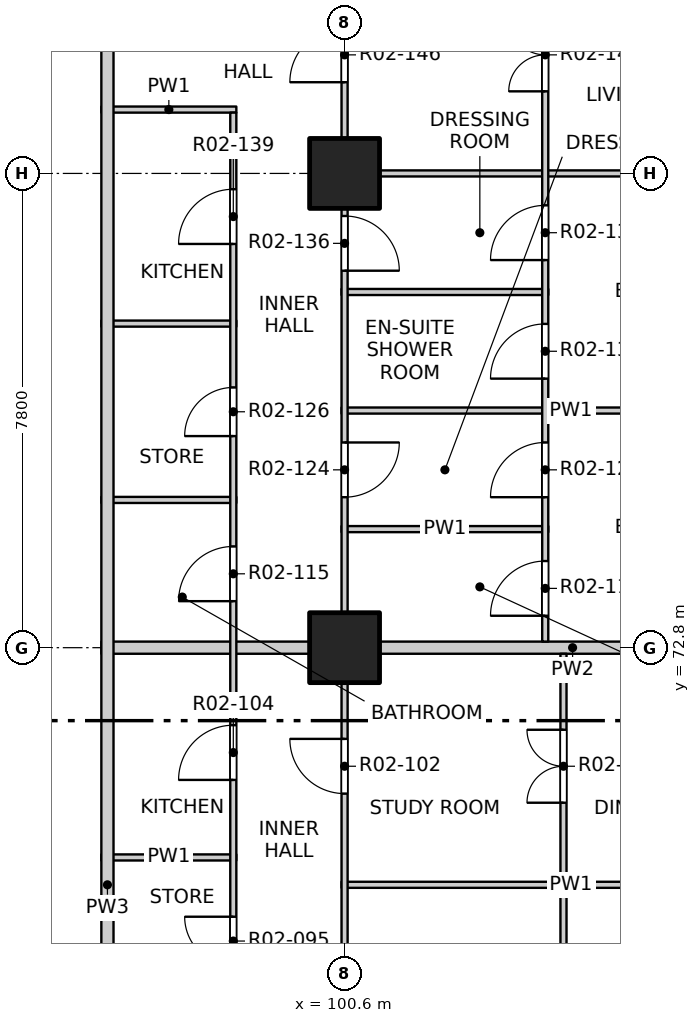
"""IFC4 building model, lengths in metres.
Left out: names, types, materials, properties, quantities, classifications, styles, units other than length and angle.
Written with IfcOpenShell. Run it as: python <this file> out.ifc"""

import sys

from ifc_helpers import new_model, si_unit, direction, frame, frame_2d, origin, origin_2d, place, context, subcontext, project, spatial, rectangle, extrude, element, fill, save


model = new_model("IFC4")
c1 = context("Model", 3, precision=1e-05, world=origin(), true_north=direction((0.0, 1.0)))
c2 = subcontext(c1, "Body", "Model", "MODEL_VIEW")
j1 = project(units=[si_unit("LENGTHUNIT", "METRE"), si_unit("PLANEANGLEUNIT", "RADIAN")], contexts=[c1])
p1 = place(None, origin())
s1 = spatial("IfcSite", under=j1, at=p1, CompositionType="ELEMENT")
p2 = place(p1, origin())
s2 = spatial("IfcBuilding", under=s1, at=p2, CompositionType="ELEMENT")
p3 = place(p2, frame((0.0, 0.0, 29.7)))
s3 = spatial("IfcBuildingStorey", under=s2, at=p3, CompositionType="ELEMENT", Elevation=29.7)
for number, where, z_axis, x_axis in (
    (1, (100.6, 72.8, -0.25), (0.0, 0.0, 1.0), (1.0, 0.0, 0.0)),
    (2, (100.6, 80.6, -0.25), (0.0, 0.0, 1.0), (1.0, 0.0, 0.0)),
):
    element("IfcColumn", number, at=place(p3, frame(where, z_axis=z_axis, x_axis=x_axis)), inside=s3, PredefinedType="COLUMN", context=c2, shape_type="SweptSolid", body=[
        extrude(rectangle(XDim=1.15, YDim=1.15, at=origin_2d()), origin(), (0.0, 0.0, 1.0), 3.4),
    ])
p4 = place(p3, frame((100.55, 68.9, 0.0), z_axis=(0.0, 0.0, 1.0), x_axis=(1.0, 0.0, 0.0)))
e3 = element("IfcWall", 3, at=p4, inside=s3, PredefinedType="PARTITIONING", context=c2, shape_type="SweptSolid", body=[
    extrude(rectangle(XDim=7.55, YDim=0.1, at=frame_2d((3.775, 0.0))), origin(), (0.0, 0.0, 1.0), 3.15),
])
p5 = place(p3, frame((96.6, 69.35, 0.0), z_axis=(0.0, 0.0, 1.0), x_axis=(1.0, 0.0, 0.0)))
e4 = element("IfcWall", 4, at=p5, inside=s3, PredefinedType="PARTITIONING", context=c2, shape_type="SweptSolid", body=[
    extrude(rectangle(XDim=2.22, YDim=0.1, at=frame_2d((1.11, 0.0))), origin(), (0.0, 0.0, 1.0), 3.15),
])
p6 = place(p3, frame((96.6, 72.8, 0.0), z_axis=(0.0, 0.0, 1.0), x_axis=(1.0, 0.0, 0.0)))
e5 = element("IfcWall", 5, at=p6, inside=s3, PredefinedType="PARTITIONING", context=c2, shape_type="SweptSolid", body=[
    extrude(rectangle(XDim=4.0, YDim=0.2, at=frame_2d((2.0, 0.0))), origin(), (0.0, 0.0, 1.0), 3.15),
])
p7 = place(p3, frame((100.6, 72.8, 0.0), z_axis=(0.0, 0.0, 1.0), x_axis=(1.0, 0.0, 0.0)))
e6 = element("IfcWall", 6, at=p7, inside=s3, PredefinedType="PARTITIONING", context=c2, shape_type="SweptSolid", body=[
    extrude(rectangle(XDim=7.5, YDim=0.2, at=frame_2d((3.75, 0.0))), origin(), (0.0, 0.0, 1.0), 2.55),
])
p8 = place(p3, frame((100.55, 74.75, 0.0), z_axis=(0.0, 0.0, 1.0), x_axis=(1.0, 0.0, 0.0)))
e7 = element("IfcWall", 7, at=p8, inside=s3, PredefinedType="PARTITIONING", context=c2, shape_type="SweptSolid", body=[
    extrude(rectangle(XDim=3.4, YDim=0.1, at=frame_2d((1.7, 0.0))), origin(), (0.0, 0.0, 1.0), 3.15),
])
p9 = place(p3, frame((96.6, 75.23, 0.0), z_axis=(0.0, 0.0, 1.0), x_axis=(1.0, 0.0, 0.0)))
e8 = element("IfcWall", 8, at=p9, inside=s3, PredefinedType="PARTITIONING", context=c2, shape_type="SweptSolid", body=[
    extrude(rectangle(XDim=2.22, YDim=0.1, at=frame_2d((1.11, 0.0))), origin(), (0.0, 0.0, 1.0), 3.15),
])
p10 = place(p3, frame((100.55, 76.7, 0.0), z_axis=(0.0, 0.0, 1.0), x_axis=(1.0, 0.0, 0.0)))
e9 = element("IfcWall", 9, at=p10, inside=s3, PredefinedType="PARTITIONING", context=c2, shape_type="SweptSolid", body=[
    extrude(rectangle(XDim=7.55, YDim=0.1, at=frame_2d((3.775, 0.0))), origin(), (0.0, 0.0, 1.0), 3.15),
])
p11 = place(p3, frame((96.6, 78.13, 0.0), z_axis=(0.0, 0.0, 1.0), x_axis=(1.0, 0.0, 0.0)))
e10 = element("IfcWall", 10, at=p11, inside=s3, PredefinedType="PARTITIONING", context=c2, shape_type="SweptSolid", body=[
    extrude(rectangle(XDim=2.22, YDim=0.1, at=frame_2d((1.11, 0.0))), origin(), (0.0, 0.0, 1.0), 3.15),
])
p12 = place(p3, frame((100.55, 78.65, 0.0), z_axis=(0.0, 0.0, 1.0), x_axis=(1.0, 0.0, 0.0)))
e11 = element("IfcWall", 11, at=p12, inside=s3, PredefinedType="PARTITIONING", context=c2, shape_type="SweptSolid", body=[
    extrude(rectangle(XDim=3.4, YDim=0.1, at=frame_2d((1.7, 0.0))), origin(), (0.0, 0.0, 1.0), 3.15),
])
p13 = place(p3, frame((100.55, 80.6, 0.0), z_axis=(0.0, 0.0, 1.0), x_axis=(1.0, 0.0, 0.0)))
e12 = element("IfcWall", 12, at=p13, inside=s3, PredefinedType="PARTITIONING", context=c2, shape_type="SweptSolid", body=[
    extrude(rectangle(XDim=7.55, YDim=0.1, at=frame_2d((3.775, 0.0))), origin(), (0.0, 0.0, 1.0), 2.55),
])
p14 = place(p3, frame((96.6, 81.65, 0.0), z_axis=(0.0, 0.0, 1.0), x_axis=(1.0, 0.0, 0.0)))
e13 = element("IfcWall", 13, at=p14, inside=s3, PredefinedType="PARTITIONING", context=c2, shape_type="SweptSolid", body=[
    extrude(rectangle(XDim=2.22, YDim=0.1, at=frame_2d((1.11, 0.0))), origin(), (0.0, 0.0, 1.0), 3.15),
])
p15 = place(p3, frame((96.7, 53.4, 0.0), z_axis=(0.0, 0.0, 1.0), x_axis=(0.0, 1.0, 0.0)))
e14 = element("IfcWall", 14, at=p15, inside=s3, PredefinedType="PARTITIONING", context=c2, shape_type="SweptSolid", body=[
    extrude(rectangle(XDim=31.0, YDim=0.2, at=frame_2d((15.5, 0.0))), origin(), (0.0, 0.0, 1.0), 3.15),
])
p16 = place(p15, frame((2.425, 0.0, 0.0)))
e15 = element("IfcOpeningElement", 15, at=p16, cuts=e14, PredefinedType="OPENING", context=c2, shape_type="SweptSolid", body=[
    extrude(rectangle(XDim=1.0, YDim=2.1, at=frame_2d((0.5, 1.05))), frame((0.0, 0.11, 0.0), z_axis=(0.0, -1.0, 0.0), x_axis=(1.0, 0.0, 0.0)), (0.0, 0.0, 1.0), 0.22),
])
p17 = place(p15, frame((13.375, 0.0, 0.0)))
e16 = element("IfcOpeningElement", 16, at=p17, cuts=e14, PredefinedType="OPENING", context=c2, shape_type="SweptSolid", body=[
    extrude(rectangle(XDim=1.0, YDim=2.1, at=frame_2d((0.5, 1.05))), frame((0.0, 0.11, 0.0), z_axis=(0.0, -1.0, 0.0), x_axis=(1.0, 0.0, 0.0)), (0.0, 0.0, 1.0), 0.22),
])
p18 = place(p15, frame((29.525, 0.0, 0.0)))
e17 = element("IfcOpeningElement", 17, at=p18, cuts=e14, PredefinedType="OPENING", context=c2, shape_type="SweptSolid", body=[
    extrude(rectangle(XDim=1.0, YDim=2.1, at=frame_2d((0.5, 1.05))), frame((0.0, 0.11, 0.0), z_axis=(0.0, -1.0, 0.0), x_axis=(1.0, 0.0, 0.0)), (0.0, 0.0, 1.0), 0.22),
])
p19 = place(p3, frame((98.77, 66.65, 0.0), z_axis=(0.0, 0.0, 1.0), x_axis=(0.0, 1.0, 0.0)))
e18 = element("IfcWall", 18, at=p19, inside=s3, PredefinedType="PARTITIONING", context=c2, shape_type="SweptSolid", body=[
    extrude(rectangle(XDim=14.95, YDim=0.1, at=frame_2d((7.475, 0.0))), origin(), (0.0, 0.0, 1.0), 3.15),
])
p20 = place(p19, frame((0.925, 0.0, 0.0)))
e19 = element("IfcOpeningElement", 19, at=p20, cuts=e18, PredefinedType="OPENING", context=c2, shape_type="SweptSolid", body=[
    extrude(rectangle(XDim=0.8, YDim=2.1, at=frame_2d((0.4, 1.05))), frame((0.0, 0.06, 0.0), z_axis=(0.0, -1.0, 0.0), x_axis=(1.0, 0.0, 0.0)), (0.0, 0.0, 1.0), 0.12),
])
p21 = place(p19, frame((3.975, 0.0, 0.0)))
e20 = element("IfcOpeningElement", 20, at=p21, cuts=e18, PredefinedType="OPENING", context=c2, shape_type="SweptSolid", body=[
    extrude(rectangle(XDim=0.9, YDim=2.1, at=frame_2d((0.45, 1.05))), frame((0.0, 0.06, 0.0), z_axis=(0.0, -1.0, 0.0), x_axis=(1.0, 0.0, 0.0)), (0.0, 0.0, 1.0), 0.12),
])
p22 = place(p19, frame((6.915, 0.0, 0.0)))
e21 = element("IfcOpeningElement", 21, at=p22, cuts=e18, PredefinedType="OPENING", context=c2, shape_type="SweptSolid", body=[
    extrude(rectangle(XDim=0.9, YDim=2.1, at=frame_2d((0.45, 1.05))), frame((0.0, 0.06, 0.0), z_axis=(0.0, -1.0, 0.0), x_axis=(1.0, 0.0, 0.0)), (0.0, 0.0, 1.0), 0.12),
])
p23 = place(p19, frame((9.63, 0.0, 0.0)))
e22 = element("IfcOpeningElement", 22, at=p23, cuts=e18, PredefinedType="OPENING", context=c2, shape_type="SweptSolid", body=[
    extrude(rectangle(XDim=0.8, YDim=2.1, at=frame_2d((0.4, 1.05))), frame((0.0, 0.06, 0.0), z_axis=(0.0, -1.0, 0.0), x_axis=(1.0, 0.0, 0.0)), (0.0, 0.0, 1.0), 0.12),
])
p24 = place(p19, frame((12.79, 0.0, 0.0)))
e23 = element("IfcOpeningElement", 23, at=p24, cuts=e18, PredefinedType="OPENING", context=c2, shape_type="SweptSolid", body=[
    extrude(rectangle(XDim=0.9, YDim=2.1, at=frame_2d((0.45, 1.05))), frame((0.0, 0.06, 0.0), z_axis=(0.0, -1.0, 0.0), x_axis=(1.0, 0.0, 0.0)), (0.0, 0.0, 1.0), 0.12),
])
p25 = place(p3, frame((100.6, 49.4, 0.0), z_axis=(0.0, 0.0, 1.0), x_axis=(0.0, 1.0, 0.0)))
e24 = element("IfcWall", 24, at=p25, inside=s3, PredefinedType="PARTITIONING", context=c2, shape_type="SweptSolid", body=[
    extrude(rectangle(XDim=31.2, YDim=0.1, at=frame_2d((15.6, 0.0))), origin(), (0.0, 0.0, 1.0), 3.15),
])
p26 = place(p25, frame((2.475, 0.0, 0.0)))
e25 = element("IfcOpeningElement", 25, at=p26, cuts=e24, PredefinedType="OPENING", context=c2, shape_type="SweptSolid", body=[
    extrude(rectangle(XDim=0.9, YDim=2.1, at=frame_2d((0.45, 1.05))), frame((0.0, 0.06, 0.0), z_axis=(0.0, -1.0, 0.0), x_axis=(1.0, 0.0, 0.0)), (0.0, 0.0, 1.0), 0.12),
])
p27 = place(p25, frame((5.4, 0.0, 0.0)))
e26 = element("IfcOpeningElement", 26, at=p27, cuts=e24, PredefinedType="OPENING", context=c2, shape_type="SweptSolid", body=[
    extrude(rectangle(XDim=0.9, YDim=2.1, at=frame_2d((0.45, 1.05))), frame((0.0, 0.06, 0.0), z_axis=(0.0, -1.0, 0.0), x_axis=(1.0, 0.0, 0.0)), (0.0, 0.0, 1.0), 0.12),
])
p28 = place(p25, frame((10.275, 0.0, 0.0)))
e27 = element("IfcOpeningElement", 27, at=p28, cuts=e24, PredefinedType="OPENING", context=c2, shape_type="SweptSolid", body=[
    extrude(rectangle(XDim=0.9, YDim=2.1, at=frame_2d((0.45, 1.05))), frame((0.0, 0.06, 0.0), z_axis=(0.0, -1.0, 0.0), x_axis=(1.0, 0.0, 0.0)), (0.0, 0.0, 1.0), 0.12),
])
p29 = place(p25, frame((14.0, 0.0, 0.0)))
e28 = element("IfcOpeningElement", 28, at=p29, cuts=e24, PredefinedType="OPENING", context=c2, shape_type="SweptSolid", body=[
    extrude(rectangle(XDim=0.9, YDim=2.1, at=frame_2d((0.45, 1.05))), frame((0.0, 0.06, 0.0), z_axis=(0.0, -1.0, 0.0), x_axis=(1.0, 0.0, 0.0)), (0.0, 0.0, 1.0), 0.12),
])
p30 = place(p25, frame((17.1, 0.0, 0.0)))
e29 = element("IfcOpeningElement", 29, at=p30, cuts=e24, PredefinedType="OPENING", context=c2, shape_type="SweptSolid", body=[
    extrude(rectangle(XDim=0.9, YDim=2.1, at=frame_2d((0.45, 1.05))), frame((0.0, 0.06, 0.0), z_axis=(0.0, -1.0, 0.0), x_axis=(1.0, 0.0, 0.0)), (0.0, 0.0, 1.0), 0.12),
])
p31 = place(p25, frame((21.0, 0.0, 0.0)))
e30 = element("IfcOpeningElement", 30, at=p31, cuts=e24, PredefinedType="OPENING", context=c2, shape_type="SweptSolid", body=[
    extrude(rectangle(XDim=0.9, YDim=2.1, at=frame_2d((0.45, 1.05))), frame((0.0, 0.06, 0.0), z_axis=(0.0, -1.0, 0.0), x_axis=(1.0, 0.0, 0.0)), (0.0, 0.0, 1.0), 0.12),
])
p32 = place(p25, frame((25.875, 0.0, 0.0)))
e31 = element("IfcOpeningElement", 31, at=p32, cuts=e24, PredefinedType="OPENING", context=c2, shape_type="SweptSolid", body=[
    extrude(rectangle(XDim=0.9, YDim=2.1, at=frame_2d((0.45, 1.05))), frame((0.0, 0.06, 0.0), z_axis=(0.0, -1.0, 0.0), x_axis=(1.0, 0.0, 0.0)), (0.0, 0.0, 1.0), 0.12),
])
p33 = place(p25, frame((29.6, 0.0, 0.0)))
e32 = element("IfcOpeningElement", 32, at=p33, cuts=e24, PredefinedType="OPENING", context=c2, shape_type="SweptSolid", body=[
    extrude(rectangle(XDim=0.9, YDim=2.1, at=frame_2d((0.45, 1.05))), frame((0.0, 0.06, 0.0), z_axis=(0.0, -1.0, 0.0), x_axis=(1.0, 0.0, 0.0)), (0.0, 0.0, 1.0), 0.12),
])
p34 = place(p3, frame((100.6, 80.6, 0.0), z_axis=(0.0, 0.0, 1.0), x_axis=(0.0, 1.0, 0.0)))
e33 = element("IfcWall", 33, at=p34, inside=s3, PredefinedType="PARTITIONING", context=c2, shape_type="SweptSolid", body=[
    extrude(rectangle(XDim=7.5, YDim=0.1, at=frame_2d((3.75, 0.0))), origin(), (0.0, 0.0, 1.0), 2.55),
])
p35 = place(p34, frame((1.5, 0.0, 0.0)))
e34 = element("IfcOpeningElement", 34, at=p35, cuts=e33, PredefinedType="OPENING", context=c2, shape_type="SweptSolid", body=[
    extrude(rectangle(XDim=0.9, YDim=2.1, at=frame_2d((0.45, 1.05))), frame((0.0, 0.06, 0.0), z_axis=(0.0, -1.0, 0.0), x_axis=(1.0, 0.0, 0.0)), (0.0, 0.0, 1.0), 0.12),
])
p36 = place(p34, frame((5.4, 0.0, 0.0)))
e35 = element("IfcOpeningElement", 35, at=p36, cuts=e33, PredefinedType="OPENING", context=c2, shape_type="SweptSolid", body=[
    extrude(rectangle(XDim=0.9, YDim=2.1, at=frame_2d((0.45, 1.05))), frame((0.0, 0.06, 0.0), z_axis=(0.0, -1.0, 0.0), x_axis=(1.0, 0.0, 0.0)), (0.0, 0.0, 1.0), 0.12),
])
p37 = place(p3, frame((103.9, 72.9, 0.0), z_axis=(0.0, 0.0, 1.0), x_axis=(0.0, 1.0, 0.0)))
e36 = element("IfcWall", 36, at=p37, inside=s3, PredefinedType="PARTITIONING", context=c2, shape_type="SweptSolid", body=[
    extrude(rectangle(XDim=15.2, YDim=0.1, at=frame_2d((7.6, 0.0))), origin(), (0.0, 0.0, 1.0), 3.15),
])
p38 = place(p37, frame((0.425, 0.0, 0.0)))
e37 = element("IfcOpeningElement", 37, at=p38, cuts=e36, PredefinedType="OPENING", context=c2, shape_type="SweptSolid", body=[
    extrude(rectangle(XDim=0.9, YDim=2.1, at=frame_2d((0.45, 1.05))), frame((0.0, 0.06, 0.0), z_axis=(0.0, -1.0, 0.0), x_axis=(1.0, 0.0, 0.0)), (0.0, 0.0, 1.0), 0.12),
])
p39 = place(p37, frame((2.375, 0.0, 0.0)))
e38 = element("IfcOpeningElement", 38, at=p39, cuts=e36, PredefinedType="OPENING", context=c2, shape_type="SweptSolid", body=[
    extrude(rectangle(XDim=0.9, YDim=2.1, at=frame_2d((0.45, 1.05))), frame((0.0, 0.06, 0.0), z_axis=(0.0, -1.0, 0.0), x_axis=(1.0, 0.0, 0.0)), (0.0, 0.0, 1.0), 0.12),
])
p40 = place(p37, frame((4.325, 0.0, 0.0)))
e39 = element("IfcOpeningElement", 39, at=p40, cuts=e36, PredefinedType="OPENING", context=c2, shape_type="SweptSolid", body=[
    extrude(rectangle(XDim=0.9, YDim=2.1, at=frame_2d((0.45, 1.05))), frame((0.0, 0.06, 0.0), z_axis=(0.0, -1.0, 0.0), x_axis=(1.0, 0.0, 0.0)), (0.0, 0.0, 1.0), 0.12),
])
p41 = place(p37, frame((6.275, 0.0, 0.0)))
e40 = element("IfcOpeningElement", 40, at=p41, cuts=e36, PredefinedType="OPENING", context=c2, shape_type="SweptSolid", body=[
    extrude(rectangle(XDim=0.9, YDim=2.1, at=frame_2d((0.45, 1.05))), frame((0.0, 0.06, 0.0), z_axis=(0.0, -1.0, 0.0), x_axis=(1.0, 0.0, 0.0)), (0.0, 0.0, 1.0), 0.12),
])
p42 = place(p37, frame((9.05, 0.0, 0.0)))
e41 = element("IfcOpeningElement", 41, at=p42, cuts=e36, PredefinedType="OPENING", context=c2, shape_type="SweptSolid", body=[
    extrude(rectangle(XDim=1.2, YDim=2.1, at=frame_2d((0.6, 1.05))), frame((0.0, 0.06, 0.0), z_axis=(0.0, -1.0, 0.0), x_axis=(1.0, 0.0, 0.0)), (0.0, 0.0, 1.0), 0.12),
])
p43 = place(p37, frame((12.95, 0.0, 0.0)))
e42 = element("IfcOpeningElement", 42, at=p43, cuts=e36, PredefinedType="OPENING", context=c2, shape_type="SweptSolid", body=[
    extrude(rectangle(XDim=1.2, YDim=2.1, at=frame_2d((0.6, 1.05))), frame((0.0, 0.06, 0.0), z_axis=(0.0, -1.0, 0.0), x_axis=(1.0, 0.0, 0.0)), (0.0, 0.0, 1.0), 0.12),
])
p44 = place(p3, frame((104.2, 61.2, 0.0), z_axis=(0.0, 0.0, 1.0), x_axis=(0.0, 1.0, 0.0)))
e43 = element("IfcWall", 43, at=p44, inside=s3, PredefinedType="PARTITIONING", context=c2, shape_type="SweptSolid", body=[
    extrude(rectangle(XDim=11.5, YDim=0.1, at=frame_2d((5.75, 0.0))), origin(), (0.0, 0.0, 1.0), 3.15),
])
p45 = place(p44, frame((0.425, 0.0, 0.0)))
e44 = element("IfcOpeningElement", 44, at=p45, cuts=e43, PredefinedType="OPENING", context=c2, shape_type="SweptSolid", body=[
    extrude(rectangle(XDim=0.9, YDim=2.1, at=frame_2d((0.45, 1.05))), frame((0.0, 0.06, 0.0), z_axis=(0.0, -1.0, 0.0), x_axis=(1.0, 0.0, 0.0)), (0.0, 0.0, 1.0), 0.12),
])
p46 = place(p44, frame((2.375, 0.0, 0.0)))
e45 = element("IfcOpeningElement", 45, at=p46, cuts=e43, PredefinedType="OPENING", context=c2, shape_type="SweptSolid", body=[
    extrude(rectangle(XDim=0.9, YDim=2.1, at=frame_2d((0.45, 1.05))), frame((0.0, 0.06, 0.0), z_axis=(0.0, -1.0, 0.0), x_axis=(1.0, 0.0, 0.0)), (0.0, 0.0, 1.0), 0.12),
])
p47 = place(p44, frame((5.15, 0.0, 0.0)))
e46 = element("IfcOpeningElement", 46, at=p47, cuts=e43, PredefinedType="OPENING", context=c2, shape_type="SweptSolid", body=[
    extrude(rectangle(XDim=1.2, YDim=2.1, at=frame_2d((0.6, 1.05))), frame((0.0, 0.06, 0.0), z_axis=(0.0, -1.0, 0.0), x_axis=(1.0, 0.0, 0.0)), (0.0, 0.0, 1.0), 0.12),
])
p48 = place(p44, frame((9.05, 0.0, 0.0)))
e47 = element("IfcOpeningElement", 47, at=p48, cuts=e43, PredefinedType="OPENING", context=c2, shape_type="SweptSolid", body=[
    extrude(rectangle(XDim=1.2, YDim=2.1, at=frame_2d((0.6, 1.05))), frame((0.0, 0.06, 0.0), z_axis=(0.0, -1.0, 0.0), x_axis=(1.0, 0.0, 0.0)), (0.0, 0.0, 1.0), 0.12),
])
p49 = place(p20, origin())
e48 = element("IfcDoor", 48, at=p49, inside=s3, OperationType="SINGLE_SWING_RIGHT", PredefinedType="DOOR", context=c2, shape_type="SweptSolid", body=[
    extrude(rectangle(XDim=0.8, YDim=2.1, at=frame_2d((0.4, 1.05))), frame((0.0, 0.025, 0.0), z_axis=(0.0, -1.0, 0.0), x_axis=(1.0, 0.0, 0.0)), (0.0, 0.0, 1.0), 0.05),
])
fill(e19, e48)
p50 = place(p31, origin())
e49 = element("IfcDoor", 49, at=p50, inside=s3, OperationType="SINGLE_SWING_RIGHT", PredefinedType="DOOR", context=c2, shape_type="SweptSolid", body=[
    extrude(rectangle(XDim=0.9, YDim=2.1, at=frame_2d((0.45, 1.05))), frame((0.0, 0.025, 0.0), z_axis=(0.0, -1.0, 0.0), x_axis=(1.0, 0.0, 0.0)), (0.0, 0.0, 1.0), 0.05),
])
fill(e30, e49)
p51 = place(p48, origin())
e50 = element("IfcDoor", 50, at=p51, inside=s3, OperationType="DOUBLE_DOOR_SINGLE_SWING", PredefinedType="DOOR", context=c2, shape_type="SweptSolid", body=[
    extrude(rectangle(XDim=1.2, YDim=2.1, at=frame_2d((0.6, 1.05))), frame((0.0, 0.025, 0.0), z_axis=(0.0, -1.0, 0.0), x_axis=(1.0, 0.0, 0.0)), (0.0, 0.0, 1.0), 0.05),
])
fill(e47, e50)
p52 = place(p21, origin())
e51 = element("IfcDoor", 51, at=p52, inside=s3, OperationType="SINGLE_SWING_LEFT", PredefinedType="DOOR", context=c2, shape_type="SweptSolid", body=[
    extrude(rectangle(XDim=0.9, YDim=2.1, at=frame_2d((0.45, 1.05))), frame((0.0, 0.025, 0.0), z_axis=(0.0, -1.0, 0.0), x_axis=(1.0, 0.0, 0.0)), (0.0, 0.0, 1.0), 0.05),
])
fill(e20, e51)
p53 = place(p38, origin())
e52 = element("IfcDoor", 52, at=p53, inside=s3, OperationType="SINGLE_SWING_LEFT", PredefinedType="DOOR", context=c2, shape_type="SweptSolid", body=[
    extrude(rectangle(XDim=0.9, YDim=2.1, at=frame_2d((0.45, 1.05))), frame((0.0, 0.025, 0.0), z_axis=(0.0, -1.0, 0.0), x_axis=(1.0, 0.0, 0.0)), (0.0, 0.0, 1.0), 0.05),
])
fill(e37, e52)
p54 = place(p22, origin())
e53 = element("IfcDoor", 53, at=p54, inside=s3, OperationType="SINGLE_SWING_LEFT", PredefinedType="DOOR", context=c2, shape_type="SweptSolid", body=[
    extrude(rectangle(XDim=0.9, YDim=2.1, at=frame_2d((0.45, 1.05))), frame((0.0, 0.025, 0.0), z_axis=(0.0, -1.0, 0.0), x_axis=(1.0, 0.0, 0.0)), (0.0, 0.0, 1.0), 0.05),
])
fill(e21, e53)
p55 = place(p32, origin())
e54 = element("IfcDoor", 54, at=p55, inside=s3, OperationType="SINGLE_SWING_LEFT", PredefinedType="DOOR", context=c2, shape_type="SweptSolid", body=[
    extrude(rectangle(XDim=0.9, YDim=2.1, at=frame_2d((0.45, 1.05))), frame((0.0, 0.025, 0.0), z_axis=(0.0, -1.0, 0.0), x_axis=(1.0, 0.0, 0.0)), (0.0, 0.0, 1.0), 0.05),
])
fill(e31, e54)
p56 = place(p39, origin())
e55 = element("IfcDoor", 55, at=p56, inside=s3, OperationType="SINGLE_SWING_LEFT", PredefinedType="DOOR", context=c2, shape_type="SweptSolid", body=[
    extrude(rectangle(XDim=0.9, YDim=2.1, at=frame_2d((0.45, 1.05))), frame((0.0, 0.025, 0.0), z_axis=(0.0, -1.0, 0.0), x_axis=(1.0, 0.0, 0.0)), (0.0, 0.0, 1.0), 0.05),
])
fill(e38, e55)
p57 = place(p23, origin())
e56 = element("IfcDoor", 56, at=p57, inside=s3, OperationType="SINGLE_SWING_LEFT", PredefinedType="DOOR", context=c2, shape_type="SweptSolid", body=[
    extrude(rectangle(XDim=0.8, YDim=2.1, at=frame_2d((0.4, 1.05))), frame((0.0, 0.025, 0.0), z_axis=(0.0, -1.0, 0.0), x_axis=(1.0, 0.0, 0.0)), (0.0, 0.0, 1.0), 0.05),
])
fill(e22, e56)
p58 = place(p40, origin())
e57 = element("IfcDoor", 57, at=p58, inside=s3, OperationType="SINGLE_SWING_LEFT", PredefinedType="DOOR", context=c2, shape_type="SweptSolid", body=[
    extrude(rectangle(XDim=0.9, YDim=2.1, at=frame_2d((0.45, 1.05))), frame((0.0, 0.025, 0.0), z_axis=(0.0, -1.0, 0.0), x_axis=(1.0, 0.0, 0.0)), (0.0, 0.0, 1.0), 0.05),
])
fill(e39, e57)
p59 = place(p33, origin())
e58 = element("IfcDoor", 58, at=p59, inside=s3, OperationType="SINGLE_SWING_RIGHT", PredefinedType="DOOR", context=c2, shape_type="SweptSolid", body=[
    extrude(rectangle(XDim=0.9, YDim=2.1, at=frame_2d((0.45, 1.05))), frame((0.0, 0.025, 0.0), z_axis=(0.0, -1.0, 0.0), x_axis=(1.0, 0.0, 0.0)), (0.0, 0.0, 1.0), 0.05),
])
fill(e32, e58)
p60 = place(p41, origin())
e59 = element("IfcDoor", 59, at=p60, inside=s3, OperationType="SINGLE_SWING_LEFT", PredefinedType="DOOR", context=c2, shape_type="SweptSolid", body=[
    extrude(rectangle(XDim=0.9, YDim=2.1, at=frame_2d((0.45, 1.05))), frame((0.0, 0.025, 0.0), z_axis=(0.0, -1.0, 0.0), x_axis=(1.0, 0.0, 0.0)), (0.0, 0.0, 1.0), 0.05),
])
fill(e40, e59)
p61 = place(p24, origin())
e60 = element("IfcDoor", 60, at=p61, inside=s3, OperationType="SINGLE_SWING_LEFT", PredefinedType="DOOR", context=c2, shape_type="SweptSolid", body=[
    extrude(rectangle(XDim=0.9, YDim=2.1, at=frame_2d((0.45, 1.05))), frame((0.0, 0.025, 0.0), z_axis=(0.0, -1.0, 0.0), x_axis=(1.0, 0.0, 0.0)), (0.0, 0.0, 1.0), 0.05),
])
fill(e23, e60)
p62 = place(p35, origin())
e61 = element("IfcDoor", 61, at=p62, inside=s3, OperationType="SINGLE_SWING_LEFT", PredefinedType="DOOR", context=c2, shape_type="SweptSolid", body=[
    extrude(rectangle(XDim=0.9, YDim=2.1, at=frame_2d((0.45, 1.05))), frame((0.0, 0.025, 0.0), z_axis=(0.0, -1.0, 0.0), x_axis=(1.0, 0.0, 0.0)), (0.0, 0.0, 1.0), 0.05),
])
fill(e34, e61)
p63 = place(p42, origin())
e62 = element("IfcDoor", 62, at=p63, inside=s3, OperationType="DOUBLE_DOOR_SINGLE_SWING", PredefinedType="DOOR", context=c2, shape_type="SweptSolid", body=[
    extrude(rectangle(XDim=1.2, YDim=2.1, at=frame_2d((0.6, 1.05))), frame((0.0, 0.025, 0.0), z_axis=(0.0, -1.0, 0.0), x_axis=(1.0, 0.0, 0.0)), (0.0, 0.0, 1.0), 0.05),
])
fill(e41, e62)
save(model, sys.argv[1])
